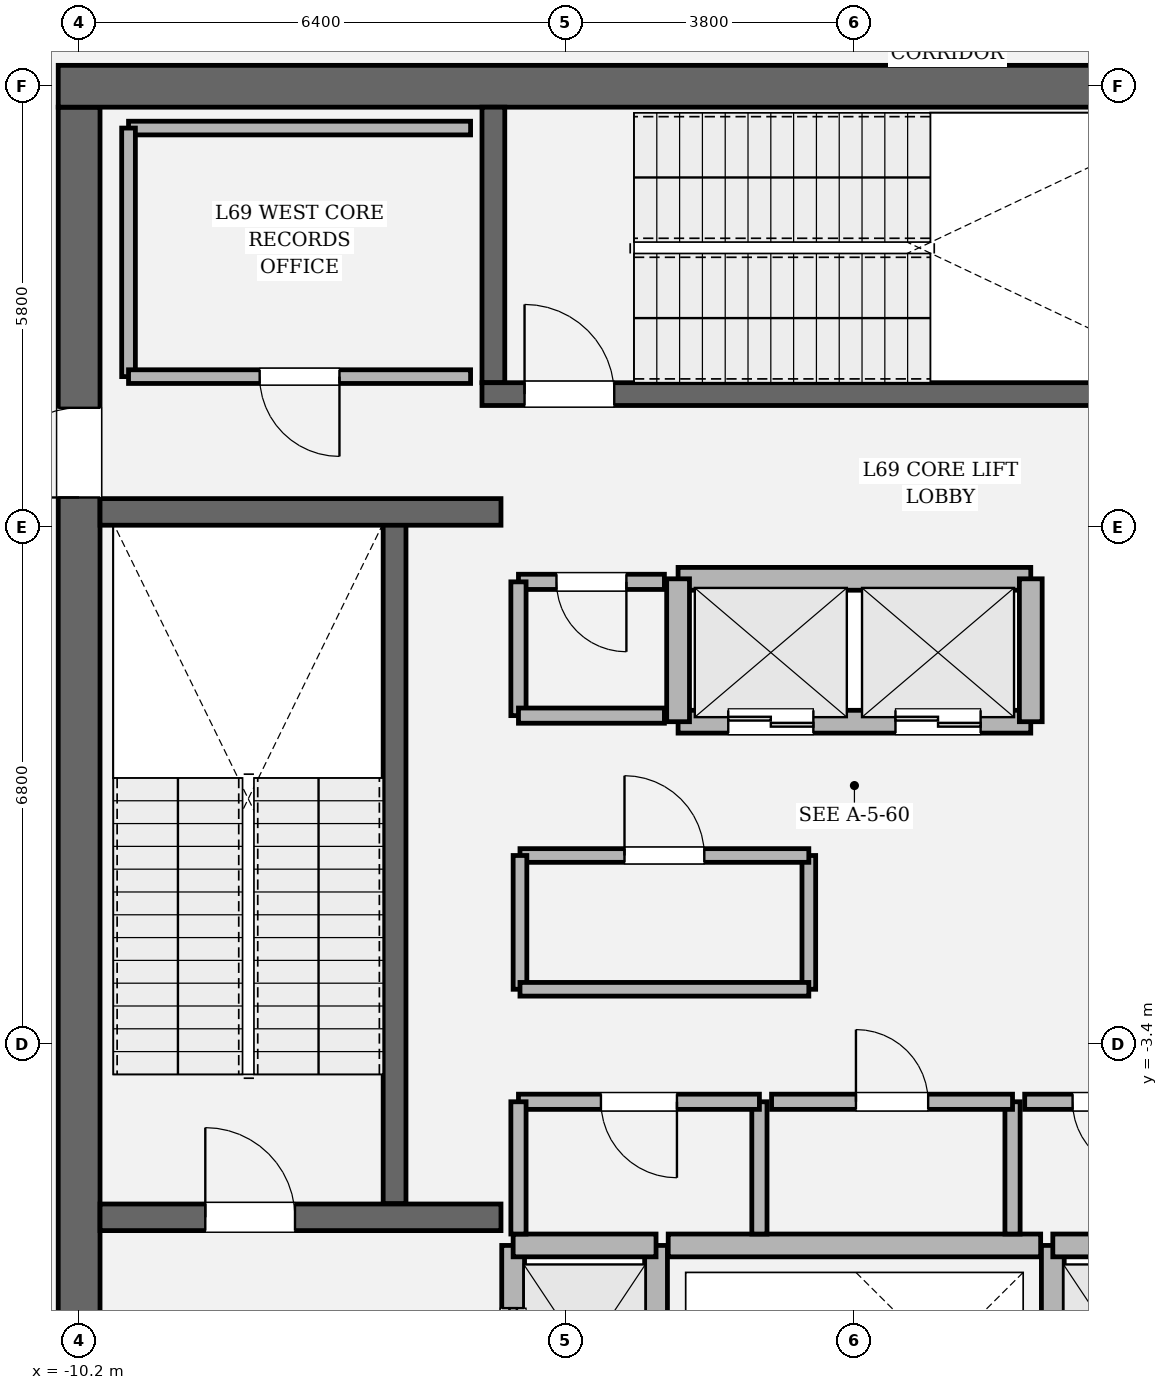
"""IFC4 building model, lengths in metres.
Left out: names, types, materials, properties, quantities, classifications, styles, units other than length and angle.
Written with IfcOpenShell. Run it as: python <this file> out.ifc"""

import sys

from ifc_helpers import new_model, si_unit, direction, frame, frame_2d, origin, place, context, subcontext, project, spatial, rectangle, extrude, element, fill, save


model = new_model("IFC4")
c1 = context("Model", 3, precision=1e-05, world=origin(), true_north=direction((0.0, 1.0)))
c2 = subcontext(c1, "Body", "Model", "MODEL_VIEW")
j1 = project(units=[si_unit("LENGTHUNIT", "METRE"), si_unit("PLANEANGLEUNIT", "RADIAN")], contexts=[c1])
p1 = place(None, origin())
s1 = spatial("IfcSite", under=j1, at=p1, CompositionType="ELEMENT")
p2 = place(p1, origin())
s2 = spatial("IfcBuilding", under=s1, at=p2, CompositionType="ELEMENT")
p3 = place(p2, frame((0.0, 0.0, 292.2)))
s3 = spatial("IfcBuildingStorey", under=s2, at=p3, CompositionType="ELEMENT", Elevation=292.2)
p4 = place(p3, frame((-10.2, -8.925, 0.0), z_axis=(0.0, 0.0, 1.0), x_axis=(0.0, 1.0, 0.0)))
e1 = element("IfcWall", 1, at=p4, inside=s3, PredefinedType="SHEAR", context=c2, shape_type="SweptSolid", body=[
    extrude(rectangle(XDim=17.85, YDim=0.55, at=frame_2d((8.925, 0.0))), origin(), (0.0, 0.0, 1.0), 4.2),
])
p5 = place(p4, frame((12.715, 0.0, 0.0)))
e2 = element("IfcOpeningElement", 2, at=p5, cuts=e1, PredefinedType="OPENING", context=c2, shape_type="SweptSolid", body=[
    extrude(rectangle(XDim=1.18, YDim=2.2, at=frame_2d((0.59, 1.1))), frame((0.0, 0.285, 0.0), z_axis=(0.0, -1.0, 0.0), x_axis=(1.0, 0.0, 0.0)), (0.0, 0.0, 1.0), 0.57),
])
p6 = place(p3, frame((-10.475, 9.2, 0.0), z_axis=(0.0, 0.0, 1.0), x_axis=(1.0, 0.0, 0.0)))
e3 = element("IfcWall", 3, at=p6, inside=s3, PredefinedType="SHEAR", context=c2, shape_type="SweptSolid", body=[
    extrude(rectangle(XDim=20.95, YDim=0.55, at=frame_2d((10.475, 0.0))), origin(), (0.0, 0.0, 1.0), 4.2),
])
p7 = place(p3, frame((-6.05, -5.5, 0.0), z_axis=(0.0, 0.0, 1.0), x_axis=(0.0, 1.0, 0.0)))
e4 = element("IfcWall", 4, at=p7, inside=s3, PredefinedType="SOLIDWALL", context=c2, shape_type="SweptSolid", body=[
    extrude(rectangle(XDim=8.95, YDim=0.3, at=frame_2d((4.475, 0.0))), origin(), (0.0, 0.0, 1.0), 4.2),
])
p8 = place(p3, frame((-4.75, 5.3, 0.0), z_axis=(0.0, 0.0, 1.0), x_axis=(0.0, 1.0, 0.0)))
e5 = element("IfcWall", 5, at=p8, inside=s3, PredefinedType="SOLIDWALL", context=c2, shape_type="SweptSolid", body=[
    extrude(rectangle(XDim=3.625, YDim=0.3, at=frame_2d((1.812, 0.0))), origin(), (0.0, 0.0, 1.0), 4.2),
])
p9 = place(p3, frame((-4.9, 5.15, 0.0), z_axis=(0.0, 0.0, 1.0), x_axis=(1.0, 0.0, 0.0)))
e6 = element("IfcWall", 6, at=p9, inside=s3, PredefinedType="SOLIDWALL", context=c2, shape_type="SweptSolid", body=[
    extrude(rectangle(XDim=9.8, YDim=0.3, at=frame_2d((4.9, 0.0))), origin(), (0.0, 0.0, 1.0), 4.2),
])
p10 = place(p9, frame((0.56, 0.0, 0.0)))
e7 = element("IfcOpeningElement", 7, at=p10, cuts=e6, PredefinedType="OPENING", context=c2, shape_type="SweptSolid", body=[
    extrude(rectangle(XDim=1.18, YDim=2.2, at=frame_2d((0.59, 1.1))), frame((0.0, 0.16, 0.0), z_axis=(0.0, -1.0, 0.0), x_axis=(1.0, 0.0, 0.0)), (0.0, 0.0, 1.0), 0.32),
])
p11 = place(p3, frame((-9.925, -5.68, 0.0), z_axis=(0.0, 0.0, 1.0), x_axis=(1.0, 0.0, 0.0)))
e8 = element("IfcWall", 8, at=p11, inside=s3, PredefinedType="SOLIDWALL", context=c2, shape_type="SweptSolid", body=[
    extrude(rectangle(XDim=5.275, YDim=0.35, at=frame_2d((2.638, 0.0))), origin(), (0.0, 0.0, 1.0), 4.2),
])
p12 = place(p11, frame((1.385, 0.0, 0.0)))
e9 = element("IfcOpeningElement", 9, at=p12, cuts=e8, PredefinedType="OPENING", context=c2, shape_type="SweptSolid", body=[
    extrude(rectangle(XDim=1.18, YDim=2.2, at=frame_2d((0.59, 1.1))), frame((0.0, 0.185, 0.0), z_axis=(0.0, -1.0, 0.0), x_axis=(1.0, 0.0, 0.0)), (0.0, 0.0, 1.0), 0.37),
])
p13 = place(p3, frame((-9.925, 3.6, 0.0), z_axis=(0.0, 0.0, 1.0), x_axis=(1.0, 0.0, 0.0)))
e10 = element("IfcWall", 10, at=p13, inside=s3, PredefinedType="SOLIDWALL", context=c2, shape_type="SweptSolid", body=[
    extrude(rectangle(XDim=5.275, YDim=0.35, at=frame_2d((2.638, 0.0))), origin(), (0.0, 0.0, 1.0), 4.2),
])
p14 = place(p3, frame((-4.49, -8.82, 0.0), z_axis=(0.0, 0.0, 1.0), x_axis=(0.0, 1.0, 0.0)))
e11 = element("IfcWall", 11, at=p14, inside=s3, PredefinedType="SOLIDWALL", context=c2, shape_type="SweptSolid", body=[
    extrude(rectangle(XDim=2.77, YDim=0.3, at=frame_2d((1.385, 0.0))), origin(), (0.0, 0.0, 1.0), 4.0),
])
p15 = place(p14, frame((0.825, 0.0, 0.0)))
e12 = element("IfcOpeningElement", 12, at=p15, cuts=e11, PredefinedType="OPENING", context=c2, shape_type="SweptSolid", body=[
    extrude(rectangle(XDim=1.12, YDim=2.25, at=frame_2d((0.56, 1.125))), frame((0.0, 0.16, 0.0), z_axis=(0.0, -1.0, 0.0), x_axis=(1.0, 0.0, 0.0)), (0.0, 0.0, 1.0), 0.32),
])
p16 = place(p3, frame((-2.61, -8.82, 0.0), z_axis=(0.0, 0.0, 1.0), x_axis=(0.0, 1.0, 0.0)))
e13 = element("IfcWall", 13, at=p16, inside=s3, PredefinedType="SOLIDWALL", context=c2, shape_type="SweptSolid", body=[
    extrude(rectangle(XDim=2.77, YDim=0.3, at=frame_2d((1.385, 0.0))), origin(), (0.0, 0.0, 1.0), 4.0),
])
p17 = place(p3, frame((-4.49, -6.05, 0.0), z_axis=(0.0, 0.0, 1.0), x_axis=(1.0, 0.0, 0.0)))
e14 = element("IfcWall", 14, at=p17, inside=s3, PredefinedType="SOLIDWALL", context=c2, shape_type="SweptSolid", body=[
    extrude(rectangle(XDim=1.88, YDim=0.3, at=frame_2d((0.94, 0.0))), origin(), (0.0, 0.0, 1.0), 4.0),
])
p18 = place(p3, frame((2.61, -8.82, 0.0), z_axis=(0.0, 0.0, 1.0), x_axis=(0.0, 1.0, 0.0)))
e15 = element("IfcWall", 15, at=p18, inside=s3, PredefinedType="SOLIDWALL", context=c2, shape_type="SweptSolid", body=[
    extrude(rectangle(XDim=2.77, YDim=0.3, at=frame_2d((1.385, 0.0))), origin(), (0.0, 0.0, 1.0), 4.0),
])
p19 = place(p3, frame((2.61, -6.05, 0.0), z_axis=(0.0, 0.0, 1.0), x_axis=(1.0, 0.0, 0.0)))
e16 = element("IfcWall", 16, at=p19, inside=s3, PredefinedType="SOLIDWALL", context=c2, shape_type="SweptSolid", body=[
    extrude(rectangle(XDim=1.88, YDim=0.3, at=frame_2d((0.94, 0.0))), origin(), (0.0, 0.0, 1.0), 4.0),
])
p20 = place(p3, frame((-2.32, 0.84, 0.0), z_axis=(0.0, 0.0, 1.0), x_axis=(1.0, 0.0, 0.0)))
e17 = element("IfcWall", 17, at=p20, inside=s3, PredefinedType="SOLIDWALL", context=c2, shape_type="SweptSolid", body=[
    extrude(rectangle(XDim=4.64, YDim=0.3, at=frame_2d((2.32, 0.0))), origin(), (0.0, 0.0, 1.0), 4.0),
])
p21 = place(p20, frame((0.66, 0.0, 0.0)))
e18 = element("IfcOpeningElement", 18, at=p21, cuts=e17, PredefinedType="OPENING", context=c2, shape_type="SweptSolid", body=[
    extrude(rectangle(XDim=1.12, YDim=2.25, at=frame_2d((0.56, 1.125))), frame((0.0, 0.16, 0.0), z_axis=(0.0, -1.0, 0.0), x_axis=(1.0, 0.0, 0.0)), (0.0, 0.0, 1.0), 0.32),
])
p22 = place(p20, frame((2.86, 0.0, 0.0)))
e19 = element("IfcOpeningElement", 19, at=p22, cuts=e17, PredefinedType="OPENING", context=c2, shape_type="SweptSolid", body=[
    extrude(rectangle(XDim=1.12, YDim=2.25, at=frame_2d((0.56, 1.125))), frame((0.0, 0.16, 0.0), z_axis=(0.0, -1.0, 0.0), x_axis=(1.0, 0.0, 0.0)), (0.0, 0.0, 1.0), 0.32),
])
p23 = place(p3, frame((-2.32, 2.72, 0.0), z_axis=(0.0, 0.0, 1.0), x_axis=(1.0, 0.0, 0.0)))
e20 = element("IfcWall", 20, at=p23, inside=s3, PredefinedType="SOLIDWALL", context=c2, shape_type="SweptSolid", body=[
    extrude(rectangle(XDim=4.64, YDim=0.3, at=frame_2d((2.32, 0.0))), origin(), (0.0, 0.0, 1.0), 4.0),
])
for number, where, z_axis, x_axis in (
    (21, (-2.32, 0.84, 0.0), (0.0, 0.0, 1.0), (0.0, 1.0, 0.0)),
    (22, (2.32, 0.84, 0.0), (0.0, 0.0, 1.0), (0.0, 1.0, 0.0)),
):
    element("IfcWall", number, at=place(p3, frame(where, z_axis=z_axis, x_axis=x_axis)), inside=s3, PredefinedType="SOLIDWALL", context=c2, shape_type="SweptSolid", body=[
        extrude(rectangle(XDim=1.88, YDim=0.3, at=frame_2d((0.94, 0.0))), origin(), (0.0, 0.0, 1.0), 4.0),
    ])
p24 = place(p3, frame((-2.45, -6.05, 0.0), z_axis=(0.0, 0.0, 1.0), x_axis=(1.0, 0.0, 0.0)))
e23 = element("IfcWall", 23, at=p24, inside=s3, PredefinedType="SOLIDWALL", context=c2, shape_type="SweptSolid", body=[
    extrude(rectangle(XDim=4.9, YDim=0.3, at=frame_2d((2.45, 0.0))), origin(), (0.0, 0.0, 1.0), 4.0),
])
p25 = place(p3, frame((-1.25, -5.9, 0.0), z_axis=(0.0, 0.0, 1.0), x_axis=(0.0, 1.0, 0.0)))
e24 = element("IfcWall", 24, at=p25, inside=s3, PredefinedType="SOLIDWALL", context=c2, shape_type="SweptSolid", body=[
    extrude(rectangle(XDim=1.74, YDim=0.2, at=frame_2d((0.87, 0.0))), origin(), (0.0, 0.0, 1.0), 4.0),
])
p26 = place(p3, frame((-1.25, -4.16, 0.0), z_axis=(0.0, 0.0, 1.0), x_axis=(-1.0, 0.0, 0.0)))
e25 = element("IfcWall", 25, at=p26, inside=s3, PredefinedType="SOLIDWALL", context=c2, shape_type="SweptSolid", body=[
    extrude(rectangle(XDim=3.17, YDim=0.2, at=frame_2d((1.585, 0.0))), origin(), (0.0, 0.0, 1.0), 4.0),
])
p27 = place(p26, frame((1.085, 0.0, 0.0)))
e26 = element("IfcOpeningElement", 26, at=p27, cuts=e25, PredefinedType="OPENING", context=c2, shape_type="SweptSolid", body=[
    extrude(rectangle(XDim=1.0, YDim=2.15, at=frame_2d((0.5, 1.075))), frame((0.0, 0.11, 0.0), z_axis=(0.0, -1.0, 0.0), x_axis=(1.0, 0.0, 0.0)), (0.0, 0.0, 1.0), 0.22),
])
for number, where, z_axis, x_axis in (
    (27, (-4.42, -4.16, 0.0), (0.0, 0.0, 1.0), (0.0, -1.0, 0.0)),
    (28, (2.08, -5.9, 0.0), (0.0, 0.0, 1.0), (0.0, 1.0, 0.0)),
):
    element("IfcWall", number, at=place(p3, frame(where, z_axis=z_axis, x_axis=x_axis)), inside=s3, PredefinedType="SOLIDWALL", context=c2, shape_type="SweptSolid", body=[
        extrude(rectangle(XDim=1.74, YDim=0.2, at=frame_2d((0.87, 0.0))), origin(), (0.0, 0.0, 1.0), 4.0),
    ])
p28 = place(p3, frame((2.08, -4.16, 0.0), z_axis=(0.0, 0.0, 1.0), x_axis=(-1.0, 0.0, 0.0)))
e29 = element("IfcWall", 29, at=p28, inside=s3, PredefinedType="SOLIDWALL", context=c2, shape_type="SweptSolid", body=[
    extrude(rectangle(XDim=3.17, YDim=0.2, at=frame_2d((1.585, 0.0))), origin(), (0.0, 0.0, 1.0), 4.0),
])
p29 = place(p28, frame((1.11, 0.0, 0.0)))
e30 = element("IfcOpeningElement", 30, at=p29, cuts=e29, PredefinedType="OPENING", context=c2, shape_type="SweptSolid", body=[
    extrude(rectangle(XDim=0.95, YDim=2.15, at=frame_2d((0.475, 1.075))), frame((0.0, 0.11, 0.0), z_axis=(0.0, -1.0, 0.0), x_axis=(1.0, 0.0, 0.0)), (0.0, 0.0, 1.0), 0.22),
])
p30 = place(p3, frame((4.42, -4.16, 0.0), z_axis=(0.0, 0.0, 1.0), x_axis=(-1.0, 0.0, 0.0)))
e31 = element("IfcWall", 31, at=p30, inside=s3, PredefinedType="SOLIDWALL", context=c2, shape_type="SweptSolid", body=[
    extrude(rectangle(XDim=2.18, YDim=0.2, at=frame_2d((1.09, 0.0))), origin(), (0.0, 0.0, 1.0), 4.0),
])
p31 = place(p30, frame((0.63, 0.0, 0.0)))
e32 = element("IfcOpeningElement", 32, at=p31, cuts=e31, PredefinedType="OPENING", context=c2, shape_type="SweptSolid", body=[
    extrude(rectangle(XDim=0.92, YDim=2.1, at=frame_2d((0.46, 1.05))), frame((0.0, 0.11, 0.0), z_axis=(0.0, -1.0, 0.0), x_axis=(1.0, 0.0, 0.0)), (0.0, 0.0, 1.0), 0.22),
])
p32 = place(p3, frame((-0.6, -2.68, 0.0), z_axis=(0.0, 0.0, 1.0), x_axis=(0.0, 1.0, 0.0)))
e33 = element("IfcWall", 33, at=p32, inside=s3, PredefinedType="PARTITIONING", context=c2, shape_type="SweptSolid", body=[
    extrude(rectangle(XDim=1.76, YDim=0.18, at=frame_2d((0.88, 0.0))), origin(), (0.0, 0.0, 1.0), 4.0),
])
p33 = place(p3, frame((-0.6, -0.92, 0.0), z_axis=(0.0, 0.0, 1.0), x_axis=(-1.0, 0.0, 0.0)))
e34 = element("IfcWall", 34, at=p33, inside=s3, PredefinedType="PARTITIONING", context=c2, shape_type="SweptSolid", body=[
    extrude(rectangle(XDim=3.8, YDim=0.18, at=frame_2d((1.9, 0.0))), origin(), (0.0, 0.0, 1.0), 4.0),
])
p34 = place(p33, frame((1.375, 0.0, 0.0)))
e35 = element("IfcOpeningElement", 35, at=p34, cuts=e34, PredefinedType="OPENING", context=c2, shape_type="SweptSolid", body=[
    extrude(rectangle(XDim=1.05, YDim=2.2, at=frame_2d((0.525, 1.1))), frame((0.0, 0.1, 0.0), z_axis=(0.0, -1.0, 0.0), x_axis=(1.0, 0.0, 0.0)), (0.0, 0.0, 1.0), 0.2),
])
p35 = place(p3, frame((-4.4, -0.92, 0.0), z_axis=(0.0, 0.0, 1.0), x_axis=(0.0, -1.0, 0.0)))
e36 = element("IfcWall", 36, at=p35, inside=s3, PredefinedType="PARTITIONING", context=c2, shape_type="SweptSolid", body=[
    extrude(rectangle(XDim=1.76, YDim=0.18, at=frame_2d((0.88, 0.0))), origin(), (0.0, 0.0, 1.0), 4.0),
])
p36 = place(p3, frame((-4.4, -2.68, 0.0), z_axis=(0.0, 0.0, 1.0), x_axis=(1.0, 0.0, 0.0)))
e37 = element("IfcWall", 37, at=p36, inside=s3, PredefinedType="PARTITIONING", context=c2, shape_type="SweptSolid", body=[
    extrude(rectangle(XDim=3.8, YDim=0.18, at=frame_2d((1.9, 0.0))), origin(), (0.0, 0.0, 1.0), 4.0),
])
p37 = place(p3, frame((-2.5, 2.68, 0.0), z_axis=(0.0, 0.0, 1.0), x_axis=(-1.0, 0.0, 0.0)))
e38 = element("IfcWall", 38, at=p37, inside=s3, PredefinedType="SOLIDWALL", context=c2, shape_type="SweptSolid", body=[
    extrude(rectangle(XDim=1.92, YDim=0.2, at=frame_2d((0.96, 0.0))), origin(), (0.0, 0.0, 1.0), 4.0),
])
p38 = place(p37, frame((0.5, 0.0, 0.0)))
e39 = element("IfcOpeningElement", 39, at=p38, cuts=e38, PredefinedType="OPENING", context=c2, shape_type="SweptSolid", body=[
    extrude(rectangle(XDim=0.92, YDim=2.1, at=frame_2d((0.46, 1.05))), frame((0.0, 0.11, 0.0), z_axis=(0.0, -1.0, 0.0), x_axis=(1.0, 0.0, 0.0)), (0.0, 0.0, 1.0), 0.22),
])
p39 = place(p3, frame((-4.42, 2.68, 0.0), z_axis=(0.0, 0.0, 1.0), x_axis=(0.0, -1.0, 0.0)))
e40 = element("IfcWall", 40, at=p39, inside=s3, PredefinedType="SOLIDWALL", context=c2, shape_type="SweptSolid", body=[
    extrude(rectangle(XDim=1.76, YDim=0.2, at=frame_2d((0.88, 0.0))), origin(), (0.0, 0.0, 1.0), 4.0),
])
p40 = place(p3, frame((-4.42, 0.92, 0.0), z_axis=(0.0, 0.0, 1.0), x_axis=(1.0, 0.0, 0.0)))
e41 = element("IfcWall", 41, at=p40, inside=s3, PredefinedType="SOLIDWALL", context=c2, shape_type="SweptSolid", body=[
    extrude(rectangle(XDim=1.92, YDim=0.2, at=frame_2d((0.96, 0.0))), origin(), (0.0, 0.0, 1.0), 4.0),
])
p41 = place(p3, frame((-5.05, 8.65, 0.0), z_axis=(0.0, 0.0, 1.0), x_axis=(-1.0, 0.0, 0.0)))
e42 = element("IfcWall", 42, at=p41, inside=s3, PredefinedType="PARTITIONING", context=c2, shape_type="SweptSolid", body=[
    extrude(rectangle(XDim=4.5, YDim=0.18, at=frame_2d((2.25, 0.0))), origin(), (0.0, 0.0, 1.0), 4.0),
])
p42 = place(p3, frame((-9.55, 8.65, 0.0), z_axis=(0.0, 0.0, 1.0), x_axis=(0.0, -1.0, 0.0)))
e43 = element("IfcWall", 43, at=p42, inside=s3, PredefinedType="PARTITIONING", context=c2, shape_type="SweptSolid", body=[
    extrude(rectangle(XDim=3.27, YDim=0.18, at=frame_2d((1.635, 0.0))), origin(), (0.0, 0.0, 1.0), 4.0),
])
p43 = place(p3, frame((-9.55, 5.38, 0.0), z_axis=(0.0, 0.0, 1.0), x_axis=(1.0, 0.0, 0.0)))
e44 = element("IfcWall", 44, at=p43, inside=s3, PredefinedType="PARTITIONING", context=c2, shape_type="SweptSolid", body=[
    extrude(rectangle(XDim=4.5, YDim=0.18, at=frame_2d((2.25, 0.0))), origin(), (0.0, 0.0, 1.0), 4.0),
])
p44 = place(p43, frame((1.725, 0.0, 0.0)))
e45 = element("IfcOpeningElement", 45, at=p44, cuts=e44, PredefinedType="OPENING", context=c2, shape_type="SweptSolid", body=[
    extrude(rectangle(XDim=1.05, YDim=2.2, at=frame_2d((0.525, 1.1))), frame((0.0, 0.1, 0.0), z_axis=(0.0, -1.0, 0.0), x_axis=(1.0, 0.0, 0.0)), (0.0, 0.0, 1.0), 0.2),
])
p45 = place(p12, origin())
e46 = element("IfcDoor", 46, at=p45, inside=s3, OperationType="SINGLE_SWING_LEFT", PredefinedType="DOOR", context=c2, shape_type="SweptSolid", body=[
    extrude(rectangle(XDim=1.18, YDim=2.2, at=frame_2d((0.59, 1.1))), frame((0.0, 0.025, 0.0), z_axis=(0.0, -1.0, 0.0), x_axis=(1.0, 0.0, 0.0)), (0.0, 0.0, 1.0), 0.05),
])
fill(e9, e46)
p46 = place(p10, origin())
e47 = element("IfcDoor", 47, at=p46, inside=s3, OperationType="SINGLE_SWING_LEFT", PredefinedType="DOOR", context=c2, shape_type="SweptSolid", body=[
    extrude(rectangle(XDim=1.18, YDim=2.2, at=frame_2d((0.59, 1.1))), frame((0.0, 0.025, 0.0), z_axis=(0.0, -1.0, 0.0), x_axis=(1.0, 0.0, 0.0)), (0.0, 0.0, 1.0), 0.05),
])
fill(e7, e47)
p47 = place(p5, origin())
e48 = element("IfcDoor", 48, at=p47, inside=s3, OperationType="SINGLE_SWING_LEFT", PredefinedType="DOOR", context=c2, shape_type="SweptSolid", body=[
    extrude(rectangle(XDim=1.18, YDim=2.2, at=frame_2d((0.59, 1.1))), frame((0.0, 0.025, 0.0), z_axis=(0.0, -1.0, 0.0), x_axis=(1.0, 0.0, 0.0)), (0.0, 0.0, 1.0), 0.05),
])
fill(e2, e48)
p48 = place(p15, origin())
e49 = element("IfcDoor", 49, at=p48, inside=s3, OperationType="SLIDING_TO_LEFT", PredefinedType="DOOR", context=c2, shape_type="SweptSolid", body=[
    extrude(rectangle(XDim=1.12, YDim=2.25, at=frame_2d((0.56, 1.125))), frame((0.0, 0.025, 0.0), z_axis=(0.0, -1.0, 0.0), x_axis=(1.0, 0.0, 0.0)), (0.0, 0.0, 1.0), 0.05),
])
fill(e12, e49)
p49 = place(p21, origin())
e50 = element("IfcDoor", 50, at=p49, inside=s3, OperationType="DOUBLE_DOOR_SLIDING", PredefinedType="DOOR", context=c2, shape_type="SweptSolid", body=[
    extrude(rectangle(XDim=1.12, YDim=2.25, at=frame_2d((0.56, 1.125))), frame((0.0, 0.025, 0.0), z_axis=(0.0, -1.0, 0.0), x_axis=(1.0, 0.0, 0.0)), (0.0, 0.0, 1.0), 0.05),
])
fill(e18, e50)
p50 = place(p22, origin())
e51 = element("IfcDoor", 51, at=p50, inside=s3, OperationType="DOUBLE_DOOR_SLIDING", PredefinedType="DOOR", context=c2, shape_type="SweptSolid", body=[
    extrude(rectangle(XDim=1.12, YDim=2.25, at=frame_2d((0.56, 1.125))), frame((0.0, 0.025, 0.0), z_axis=(0.0, -1.0, 0.0), x_axis=(1.0, 0.0, 0.0)), (0.0, 0.0, 1.0), 0.05),
])
fill(e19, e51)
p51 = place(p27, origin())
e52 = element("IfcDoor", 52, at=p51, inside=s3, OperationType="SINGLE_SWING_LEFT", PredefinedType="DOOR", context=c2, shape_type="SweptSolid", body=[
    extrude(rectangle(XDim=1.0, YDim=2.15, at=frame_2d((0.5, 1.075))), frame((0.0, 0.025, 0.0), z_axis=(0.0, -1.0, 0.0), x_axis=(1.0, 0.0, 0.0)), (0.0, 0.0, 1.0), 0.05),
])
fill(e26, e52)
p52 = place(p29, origin())
e53 = element("IfcDoor", 53, at=p52, inside=s3, OperationType="SINGLE_SWING_RIGHT", PredefinedType="DOOR", context=c2, shape_type="SweptSolid", body=[
    extrude(rectangle(XDim=0.95, YDim=2.15, at=frame_2d((0.475, 1.075))), frame((0.0, 0.025, 0.0), z_axis=(0.0, -1.0, 0.0), x_axis=(1.0, 0.0, 0.0)), (0.0, 0.0, 1.0), 0.05),
])
fill(e30, e53)
p53 = place(p31, origin())
e54 = element("IfcDoor", 54, at=p53, inside=s3, OperationType="SINGLE_SWING_LEFT", PredefinedType="DOOR", context=c2, shape_type="SweptSolid", body=[
    extrude(rectangle(XDim=0.92, YDim=2.1, at=frame_2d((0.46, 1.05))), frame((0.0, 0.025, 0.0), z_axis=(0.0, -1.0, 0.0), x_axis=(1.0, 0.0, 0.0)), (0.0, 0.0, 1.0), 0.05),
])
fill(e32, e54)
p54 = place(p34, origin())
e55 = element("IfcDoor", 55, at=p54, inside=s3, OperationType="SINGLE_SWING_RIGHT", PredefinedType="DOOR", context=c2, shape_type="SweptSolid", body=[
    extrude(rectangle(XDim=1.05, YDim=2.2, at=frame_2d((0.525, 1.1))), frame((0.0, 0.025, 0.0), z_axis=(0.0, -1.0, 0.0), x_axis=(1.0, 0.0, 0.0)), (0.0, 0.0, 1.0), 0.05),
])
fill(e35, e55)
p55 = place(p38, origin())
e56 = element("IfcDoor", 56, at=p55, inside=s3, OperationType="SINGLE_SWING_LEFT", PredefinedType="DOOR", context=c2, shape_type="SweptSolid", body=[
    extrude(rectangle(XDim=0.92, YDim=2.1, at=frame_2d((0.46, 1.05))), frame((0.0, 0.025, 0.0), z_axis=(0.0, -1.0, 0.0), x_axis=(1.0, 0.0, 0.0)), (0.0, 0.0, 1.0), 0.05),
])
fill(e39, e56)
p56 = place(p44, origin())
e57 = element("IfcDoor", 57, at=p56, inside=s3, OperationType="SINGLE_SWING_RIGHT", PredefinedType="DOOR", context=c2, shape_type="SweptSolid", body=[
    extrude(rectangle(XDim=1.05, YDim=2.2, at=frame_2d((0.525, 1.1))), frame((0.0, 0.025, 0.0), z_axis=(0.0, -1.0, 0.0), x_axis=(1.0, 0.0, 0.0)), (0.0, 0.0, 1.0), 0.05),
])
fill(e45, e57)
save(model, sys.argv[1])
